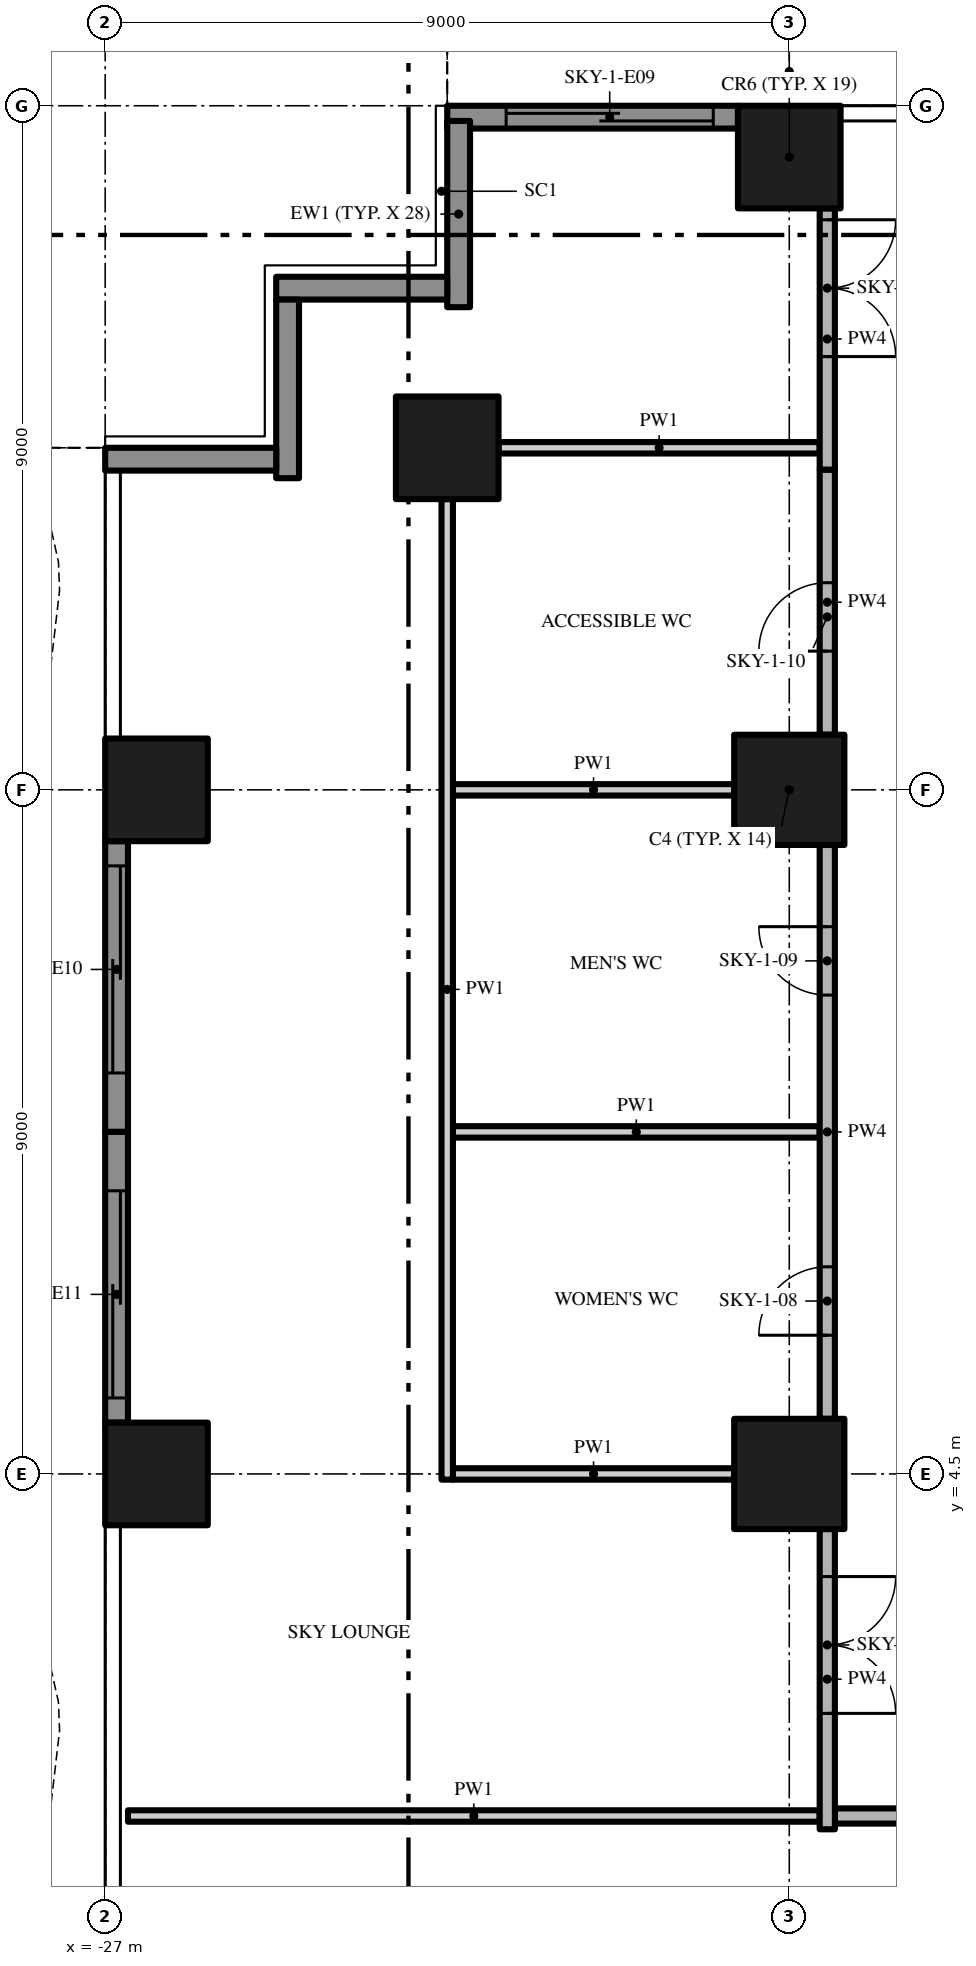
"""IFC4 building model, lengths in metres.
Left out: names, types, materials, properties, quantities, classifications, styles, units other than length and angle.
Written with IfcOpenShell. Run it as: python <this file> out.ifc"""

import sys

from ifc_helpers import new_model, si_unit, direction, frame, frame_2d, origin, origin_2d, place, context, subcontext, project, spatial, polyline, rectangle, outline, extrude, element, fill, save


model = new_model("IFC4")
c1 = context("Model", 3, precision=1e-05, world=origin(), true_north=direction((0.0, 1.0)))
c2 = subcontext(c1, "Body", "Model", "MODEL_VIEW")
j1 = project(units=[si_unit("LENGTHUNIT", "METRE"), si_unit("PLANEANGLEUNIT", "RADIAN")], contexts=[c1])
p1 = place(None, origin())
s1 = spatial("IfcSite", under=j1, at=p1, CompositionType="ELEMENT")
p2 = place(p1, origin())
s2 = spatial("IfcBuilding", under=s1, at=p2, CompositionType="ELEMENT")
p3 = place(p2, frame((0.0, 0.0, 64.4)))
s3 = spatial("IfcBuildingStorey", under=s2, at=p3, CompositionType="ELEMENT", Elevation=64.4)
p4 = place(p3, frame((-18.0, 13.5, 0.0), z_axis=(0.0, 0.0, 1.0), x_axis=(1.0, 0.0, 0.0)))
e1 = element("IfcColumn", 1, at=p4, inside=s3, PredefinedType="COLUMN", context=c2, shape_type="SweptSolid", body=[
    extrude(rectangle(XDim=1.45, YDim=1.45, at=origin_2d()), origin(), (0.0, 0.0, 1.0), 4.7),
])
p5 = place(p3, frame((-18.0, 21.825, 0.0), z_axis=(0.0, 0.0, 1.0), x_axis=(1.0, 0.0, 0.0)))
e2 = element("IfcColumn", 2, at=p5, inside=s3, PredefinedType="COLUMN", context=c2, shape_type="SweptSolid", body=[
    extrude(rectangle(XDim=1.35, YDim=1.35, at=origin_2d()), origin(), (0.0, 0.0, 1.0), 4.7),
])
p6 = place(p3, frame((-18.0, 4.5, 0.0), z_axis=(0.0, 0.0, 1.0), x_axis=(1.0, 0.0, 0.0)))
e3 = element("IfcColumn", 3, at=p6, inside=s3, PredefinedType="COLUMN", context=c2, shape_type="SweptSolid", body=[
    extrude(rectangle(XDim=1.45, YDim=1.45, at=origin_2d()), origin(), (0.0, 0.0, 1.0), 4.7),
])
for number, where, z_axis, x_axis in (
    (4, (-26.325, 13.5, 0.0), (0.0, 0.0, 1.0), (1.0, 0.0, 0.0)),
    (5, (-22.5, 18.0, 0.0), (0.0, 0.0, 1.0), (1.0, 0.0, 0.0)),
    (6, (-26.325, 4.5, 0.0), (0.0, 0.0, 1.0), (1.0, 0.0, 0.0)),
):
    element("IfcColumn", number, at=place(p3, frame(where, z_axis=z_axis, x_axis=x_axis)), inside=s3, PredefinedType="COLUMN", context=c2, shape_type="SweptSolid", body=[
        extrude(rectangle(XDim=1.35, YDim=1.35, at=origin_2d()), origin(), (0.0, 0.0, 1.0), 4.7),
    ])
p7 = place(p3, frame((-22.5, 22.35, 0.0), z_axis=(0.0, 0.0, 1.0), x_axis=(1.0, 0.0, 0.0)))
e7 = element("IfcWall", 7, at=p7, inside=s3, PredefinedType="SOLIDWALL", context=c2, shape_type="SweptSolid", body=[
    extrude(rectangle(XDim=3.825, YDim=0.3, at=frame_2d((1.913, 0.0))), origin(), (0.0, 0.0, 1.0), 4.7),
])
p8 = place(p7, frame((0.775, 0.0, 0.0)))
e8 = element("IfcOpeningElement", 8, at=p8, cuts=e7, PredefinedType="OPENING", context=c2, shape_type="SweptSolid", body=[
    extrude(rectangle(XDim=2.725, YDim=2.4, at=frame_2d((1.363, 1.2))), frame((0.0, 0.16, 0.0), z_axis=(0.0, -1.0, 0.0), x_axis=(1.0, 0.0, 0.0)), (0.0, 0.0, 1.0), 0.32),
])
p9 = place(p3, frame((-22.35, 19.85, 0.0), z_axis=(0.0, 0.0, 1.0), x_axis=(0.0, 1.0, 0.0)))
e9 = element("IfcWall", 9, at=p9, inside=s3, PredefinedType="SOLIDWALL", context=c2, shape_type="SweptSolid", body=[
    extrude(rectangle(XDim=2.45, YDim=0.3, at=frame_2d((1.225, 0.0))), origin(), (0.0, 0.0, 1.0), 4.7),
])
p10 = place(p3, frame((-24.75, 20.1, 0.0), z_axis=(0.0, 0.0, 1.0), x_axis=(1.0, 0.0, 0.0)))
e10 = element("IfcWall", 10, at=p10, inside=s3, PredefinedType="SOLIDWALL", context=c2, shape_type="SweptSolid", body=[
    extrude(rectangle(XDim=2.25, YDim=0.3, at=frame_2d((1.125, 0.0))), origin(), (0.0, 0.0, 1.0), 4.7),
])
p11 = place(p3, frame((-24.6, 17.6, 0.0), z_axis=(0.0, 0.0, 1.0), x_axis=(0.0, 1.0, 0.0)))
e11 = element("IfcWall", 11, at=p11, inside=s3, PredefinedType="SOLIDWALL", context=c2, shape_type="SweptSolid", body=[
    extrude(rectangle(XDim=2.35, YDim=0.3, at=frame_2d((1.175, 0.0))), origin(), (0.0, 0.0, 1.0), 4.7),
])
p12 = place(p3, frame((-27.0, 17.85, 0.0), z_axis=(0.0, 0.0, 1.0), x_axis=(1.0, 0.0, 0.0)))
e12 = element("IfcWall", 12, at=p12, inside=s3, PredefinedType="SOLIDWALL", context=c2, shape_type="SweptSolid", body=[
    extrude(rectangle(XDim=2.25, YDim=0.3, at=frame_2d((1.125, 0.0))), origin(), (0.0, 0.0, 1.0), 4.7),
])
p13 = place(p3, frame((-26.85, 9.0, 0.0), z_axis=(0.0, 0.0, 1.0), x_axis=(0.0, 1.0, 0.0)))
e13 = element("IfcWall", 13, at=p13, inside=s3, PredefinedType="SOLIDWALL", context=c2, shape_type="SweptSolid", body=[
    extrude(rectangle(XDim=3.825, YDim=0.3, at=frame_2d((1.913, 0.0))), origin(), (0.0, 0.0, 1.0), 4.7),
])
p14 = place(p13, frame((0.775, 0.0, 0.0)))
e14 = element("IfcOpeningElement", 14, at=p14, cuts=e13, PredefinedType="OPENING", context=c2, shape_type="SweptSolid", body=[
    extrude(rectangle(XDim=2.725, YDim=2.4, at=frame_2d((1.363, 1.2))), frame((0.0, 0.16, 0.0), z_axis=(0.0, -1.0, 0.0), x_axis=(1.0, 0.0, 0.0)), (0.0, 0.0, 1.0), 0.32),
])
p15 = place(p3, frame((-26.85, 5.175, 0.0), z_axis=(0.0, 0.0, 1.0), x_axis=(0.0, 1.0, 0.0)))
e15 = element("IfcWall", 15, at=p15, inside=s3, PredefinedType="SOLIDWALL", context=c2, shape_type="SweptSolid", body=[
    extrude(rectangle(XDim=3.825, YDim=0.3, at=frame_2d((1.913, 0.0))), origin(), (0.0, 0.0, 1.0), 4.7),
])
p16 = place(p15, frame((0.325, 0.0, 0.0)))
e16 = element("IfcOpeningElement", 16, at=p16, cuts=e15, PredefinedType="OPENING", context=c2, shape_type="SweptSolid", body=[
    extrude(rectangle(XDim=2.725, YDim=2.4, at=frame_2d((1.363, 1.2))), frame((0.0, 0.16, 0.0), z_axis=(0.0, -1.0, 0.0), x_axis=(1.0, 0.0, 0.0)), (0.0, 0.0, 1.0), 0.32),
])
p17 = place(p3, origin())
e17 = element("IfcWall", 17, at=p17, inside=s3, PredefinedType="USERDEFINED", context=c2, shape_type="SweptSolid", body=[
    extrude(outline(polyline([(-13.5, 23.451), (-15.0, 23.115), (-15.375, 23.1), (-16.5, 23.231), (-18.0, 23.755), (-19.5, 24.488), (-21.0, 25.149), (-22.5, 25.485), (-22.555, 25.241), (-21.079, 24.91), (-19.605, 24.261), (-18.096, 23.524), (-16.556, 22.986), (-15.385, 22.849), (-14.967, 22.866), (-13.445, 23.208), (-13.5, 23.451)])), origin(), (0.0, 0.0, 1.0), 0.9),
])
p18 = place(p3, origin())
e18 = element("IfcWall", 18, at=p18, inside=s3, PredefinedType="USERDEFINED", context=c2, shape_type="SweptSolid", body=[
    extrude(outline(polyline([(-27.951, 18.0), (-27.615, 16.5), (-27.6, 16.125), (-27.731, 15.0), (-28.255, 13.5), (-28.988, 12.0), (-29.649, 10.5), (-29.985, 9.0), (-30.0, 8.625), (-29.869, 7.5), (-29.345, 6.0), (-28.612, 4.5), (-27.951, 3.0), (-27.615, 1.5), (-27.6, 1.125), (-27.731, 0.0), (-28.255, -1.5), (-28.988, -3.0), (-29.649, -4.5), (-29.985, -6.0), (-30.0, -6.375), (-29.869, -7.5), (-29.345, -9.0), (-28.612, -10.5), (-27.951, -12.0), (-27.615, -13.5), (-27.6, -13.875), (-27.731, -15.0), (-28.255, -16.5), (-28.988, -18.0), (-28.763, -18.11), (-28.024, -16.596), (-27.486, -15.056), (-27.349, -13.885), (-27.366, -13.467), (-27.713, -11.921), (-28.385, -10.395), (-29.114, -8.904), (-29.624, -7.444), (-29.749, -6.365), (-29.736, -6.033), (-29.41, -4.579), (-28.761, -3.105), (-28.024, -1.596), (-27.486, -0.056), (-27.349, 1.115), (-27.366, 1.533), (-27.713, 3.079), (-28.385, 4.605), (-29.114, 6.096), (-29.624, 7.556), (-29.749, 8.635), (-29.736, 8.967), (-29.41, 10.421), (-28.761, 11.895), (-28.024, 13.404), (-27.486, 14.944), (-27.349, 16.115), (-27.366, 16.533), (-27.708, 18.055), (-27.951, 18.0)])), origin(), (0.0, 0.0, 1.0), 0.9),
])
p19 = place(p3, frame((-17.4, 0.0, 0.0), z_axis=(0.0, 0.0, 1.0), x_axis=(1.0, 0.0, 0.0)))
e19 = element("IfcWall", 19, at=p19, inside=s3, PredefinedType="PARTITIONING", context=c2, shape_type="SweptSolid", body=[
    extrude(rectangle(XDim=3.8, YDim=0.2, at=frame_2d((1.9, 0.0))), origin(), (0.0, 0.0, 1.0), 4.7),
])
p20 = place(p19, frame((0.9, 0.0, 0.0)))
e20 = element("IfcOpeningElement", 20, at=p20, cuts=e19, PredefinedType="OPENING", context=c2, shape_type="SweptSolid", body=[
    extrude(rectangle(XDim=2.0, YDim=2.4, at=frame_2d((1.0, 1.2))), frame((0.0, 0.11, 0.0), z_axis=(0.0, -1.0, 0.0), x_axis=(1.0, 0.0, 0.0)), (0.0, 0.0, 1.0), 0.22),
])
p21 = place(p3, frame((-26.7, 0.0, 0.0), z_axis=(0.0, 0.0, 1.0), x_axis=(1.0, 0.0, 0.0)))
e21 = element("IfcWall", 21, at=p21, inside=s3, PredefinedType="PARTITIONING", context=c2, shape_type="SweptSolid", body=[
    extrude(rectangle(XDim=9.1, YDim=0.15, at=frame_2d((4.55, 0.0))), origin(), (0.0, 0.0, 1.0), 4.7),
])
p22 = place(p3, frame((-22.425, 4.5, 0.0), z_axis=(0.0, 0.0, 1.0), x_axis=(1.0, 0.0, 0.0)))
e22 = element("IfcWall", 22, at=p22, inside=s3, PredefinedType="PARTITIONING", context=c2, shape_type="SweptSolid", body=[
    extrude(rectangle(XDim=3.7, YDim=0.15, at=frame_2d((1.85, 0.0))), origin(), (0.0, 0.0, 1.0), 4.7),
])
p23 = place(p3, frame((-22.425, 9.0, 0.0), z_axis=(0.0, 0.0, 1.0), x_axis=(1.0, 0.0, 0.0)))
e23 = element("IfcWall", 23, at=p23, inside=s3, PredefinedType="PARTITIONING", context=c2, shape_type="SweptSolid", body=[
    extrude(rectangle(XDim=4.825, YDim=0.15, at=frame_2d((2.413, 0.0))), origin(), (0.0, 0.0, 1.0), 4.7),
])
p24 = place(p3, frame((-22.425, 13.5, 0.0), z_axis=(0.0, 0.0, 1.0), x_axis=(1.0, 0.0, 0.0)))
e24 = element("IfcWall", 24, at=p24, inside=s3, PredefinedType="PARTITIONING", context=c2, shape_type="SweptSolid", body=[
    extrude(rectangle(XDim=3.7, YDim=0.15, at=frame_2d((1.85, 0.0))), origin(), (0.0, 0.0, 1.0), 4.7),
])
p25 = place(p3, frame((-21.825, 18.0, 0.0), z_axis=(0.0, 0.0, 1.0), x_axis=(1.0, 0.0, 0.0)))
e25 = element("IfcWall", 25, at=p25, inside=s3, PredefinedType="PARTITIONING", context=c2, shape_type="SweptSolid", body=[
    extrude(rectangle(XDim=4.225, YDim=0.15, at=frame_2d((2.112, 0.0))), origin(), (0.0, 0.0, 1.0), 4.7),
])
p26 = place(p3, frame((-22.5, 4.425, 0.0), z_axis=(0.0, 0.0, 1.0), x_axis=(0.0, 1.0, 0.0)))
e26 = element("IfcWall", 26, at=p26, inside=s3, PredefinedType="PARTITIONING", context=c2, shape_type="SweptSolid", body=[
    extrude(rectangle(XDim=12.9, YDim=0.15, at=frame_2d((6.45, 0.0))), origin(), (0.0, 0.0, 1.0), 4.7),
])
p27 = place(p3, frame((-17.5, 3.775, 0.0), z_axis=(0.0, 0.0, 1.0), x_axis=(0.0, -1.0, 0.0)))
e27 = element("IfcWall", 27, at=p27, inside=s3, PredefinedType="PARTITIONING", context=c2, shape_type="SweptSolid", body=[
    extrude(rectangle(XDim=3.95, YDim=0.2, at=frame_2d((1.975, 0.0))), origin(), (0.0, 0.0, 1.0), 4.7),
])
p28 = place(p27, frame((0.625, 0.0, 0.0)))
e28 = element("IfcOpeningElement", 28, at=p28, cuts=e27, PredefinedType="OPENING", context=c2, shape_type="SweptSolid", body=[
    extrude(rectangle(XDim=1.8, YDim=2.4, at=frame_2d((0.9, 1.2))), frame((0.0, 0.11, 0.0), z_axis=(0.0, -1.0, 0.0), x_axis=(1.0, 0.0, 0.0)), (0.0, 0.0, 1.0), 0.22),
])
p29 = place(p3, frame((-17.5, 5.225, 0.0), z_axis=(0.0, 0.0, 1.0), x_axis=(0.0, 1.0, 0.0)))
e29 = element("IfcWall", 29, at=p29, inside=s3, PredefinedType="PARTITIONING", context=c2, shape_type="SweptSolid", body=[
    extrude(rectangle(XDim=7.55, YDim=0.2, at=frame_2d((3.775, 0.0))), origin(), (0.0, 0.0, 1.0), 4.7),
])
p30 = place(p29, frame((1.1, 0.0, 0.0)))
e30 = element("IfcOpeningElement", 30, at=p30, cuts=e29, PredefinedType="OPENING", context=c2, shape_type="SweptSolid", body=[
    extrude(rectangle(XDim=0.9, YDim=2.1, at=frame_2d((0.45, 1.05))), frame((0.0, 0.11, 0.0), z_axis=(0.0, -1.0, 0.0), x_axis=(1.0, 0.0, 0.0)), (0.0, 0.0, 1.0), 0.22),
])
p31 = place(p29, frame((5.575, 0.0, 0.0)))
e31 = element("IfcOpeningElement", 31, at=p31, cuts=e29, PredefinedType="OPENING", context=c2, shape_type="SweptSolid", body=[
    extrude(rectangle(XDim=0.9, YDim=2.1, at=frame_2d((0.45, 1.05))), frame((0.0, 0.11, 0.0), z_axis=(0.0, -1.0, 0.0), x_axis=(1.0, 0.0, 0.0)), (0.0, 0.0, 1.0), 0.22),
])
p32 = place(p3, frame((-17.5, 14.225, 0.0), z_axis=(0.0, 0.0, 1.0), x_axis=(0.0, 1.0, 0.0)))
e32 = element("IfcWall", 32, at=p32, inside=s3, PredefinedType="PARTITIONING", context=c2, shape_type="SweptSolid", body=[
    extrude(rectangle(XDim=3.487, YDim=0.2, at=frame_2d((1.744, 0.0))), origin(), (0.0, 0.0, 1.0), 4.7),
])
p33 = place(p32, frame((1.1, 0.0, 0.0)))
e33 = element("IfcOpeningElement", 33, at=p33, cuts=e32, PredefinedType="OPENING", context=c2, shape_type="SweptSolid", body=[
    extrude(rectangle(XDim=0.9, YDim=2.1, at=frame_2d((0.45, 1.05))), frame((0.0, 0.11, 0.0), z_axis=(0.0, -1.0, 0.0), x_axis=(1.0, 0.0, 0.0)), (0.0, 0.0, 1.0), 0.22),
])
p34 = place(p3, frame((-17.5, 21.15, 0.0), z_axis=(0.0, 0.0, 1.0), x_axis=(0.0, -1.0, 0.0)))
e34 = element("IfcWall", 34, at=p34, inside=s3, PredefinedType="PARTITIONING", context=c2, shape_type="SweptSolid", body=[
    extrude(rectangle(XDim=3.438, YDim=0.2, at=frame_2d((1.719, 0.0))), origin(), (0.0, 0.0, 1.0), 4.7),
])
p35 = place(p34, frame((0.15, 0.0, 0.0)))
e35 = element("IfcOpeningElement", 35, at=p35, cuts=e34, PredefinedType="OPENING", context=c2, shape_type="SweptSolid", body=[
    extrude(rectangle(XDim=1.8, YDim=2.4, at=frame_2d((0.9, 1.2))), frame((0.0, 0.11, 0.0), z_axis=(0.0, -1.0, 0.0), x_axis=(1.0, 0.0, 0.0)), (0.0, 0.0, 1.0), 0.22),
])
p36 = place(p8, origin())
e36 = element("IfcDoor", 36, at=p36, inside=s3, OperationType="SINGLE_SWING_LEFT", PredefinedType="DOOR", context=c2, shape_type="SweptSolid", body=[
    extrude(rectangle(XDim=2.725, YDim=2.4, at=frame_2d((1.363, 1.2))), frame((0.0, 0.025, 0.0), z_axis=(0.0, -1.0, 0.0), x_axis=(1.0, 0.0, 0.0)), (0.0, 0.0, 1.0), 0.05),
])
fill(e8, e36)
p37 = place(p14, origin())
e37 = element("IfcDoor", 37, at=p37, inside=s3, OperationType="SINGLE_SWING_LEFT", PredefinedType="DOOR", context=c2, shape_type="SweptSolid", body=[
    extrude(rectangle(XDim=2.725, YDim=2.4, at=frame_2d((1.363, 1.2))), frame((0.0, 0.025, 0.0), z_axis=(0.0, -1.0, 0.0), x_axis=(1.0, 0.0, 0.0)), (0.0, 0.0, 1.0), 0.05),
])
fill(e14, e37)
p38 = place(p16, origin())
e38 = element("IfcDoor", 38, at=p38, inside=s3, OperationType="SINGLE_SWING_LEFT", PredefinedType="DOOR", context=c2, shape_type="SweptSolid", body=[
    extrude(rectangle(XDim=2.725, YDim=2.4, at=frame_2d((1.363, 1.2))), frame((0.0, 0.025, 0.0), z_axis=(0.0, -1.0, 0.0), x_axis=(1.0, 0.0, 0.0)), (0.0, 0.0, 1.0), 0.05),
])
fill(e16, e38)
p39 = place(p28, origin())
e39 = element("IfcDoor", 39, at=p39, inside=s3, OperationType="DOUBLE_DOOR_SINGLE_SWING", PredefinedType="DOOR", context=c2, shape_type="SweptSolid", body=[
    extrude(rectangle(XDim=1.8, YDim=2.4, at=frame_2d((0.9, 1.2))), frame((0.0, 0.025, 0.0), z_axis=(0.0, -1.0, 0.0), x_axis=(1.0, 0.0, 0.0)), (0.0, 0.0, 1.0), 0.05),
])
fill(e28, e39)
p40 = place(p35, origin())
e40 = element("IfcDoor", 40, at=p40, inside=s3, OperationType="DOUBLE_DOOR_SINGLE_SWING", PredefinedType="DOOR", context=c2, shape_type="SweptSolid", body=[
    extrude(rectangle(XDim=1.8, YDim=2.4, at=frame_2d((0.9, 1.2))), frame((0.0, 0.025, 0.0), z_axis=(0.0, -1.0, 0.0), x_axis=(1.0, 0.0, 0.0)), (0.0, 0.0, 1.0), 0.05),
])
fill(e35, e40)
p41 = place(p30, origin())
e41 = element("IfcDoor", 41, at=p41, inside=s3, OperationType="SINGLE_SWING_LEFT", PredefinedType="DOOR", context=c2, shape_type="SweptSolid", body=[
    extrude(rectangle(XDim=0.9, YDim=2.1, at=frame_2d((0.45, 1.05))), frame((0.0, 0.025, 0.0), z_axis=(0.0, -1.0, 0.0), x_axis=(1.0, 0.0, 0.0)), (0.0, 0.0, 1.0), 0.05),
])
fill(e30, e41)
p42 = place(p31, origin())
e42 = element("IfcDoor", 42, at=p42, inside=s3, OperationType="SINGLE_SWING_RIGHT", PredefinedType="DOOR", context=c2, shape_type="SweptSolid", body=[
    extrude(rectangle(XDim=0.9, YDim=2.1, at=frame_2d((0.45, 1.05))), frame((0.0, 0.025, 0.0), z_axis=(0.0, -1.0, 0.0), x_axis=(1.0, 0.0, 0.0)), (0.0, 0.0, 1.0), 0.05),
])
fill(e31, e42)
p43 = place(p33, origin())
e43 = element("IfcDoor", 43, at=p43, inside=s3, OperationType="SINGLE_SWING_LEFT", PredefinedType="DOOR", context=c2, shape_type="SweptSolid", body=[
    extrude(rectangle(XDim=0.9, YDim=2.1, at=frame_2d((0.45, 1.05))), frame((0.0, 0.025, 0.0), z_axis=(0.0, -1.0, 0.0), x_axis=(1.0, 0.0, 0.0)), (0.0, 0.0, 1.0), 0.05),
])
fill(e33, e43)
save(model, sys.argv[1])
